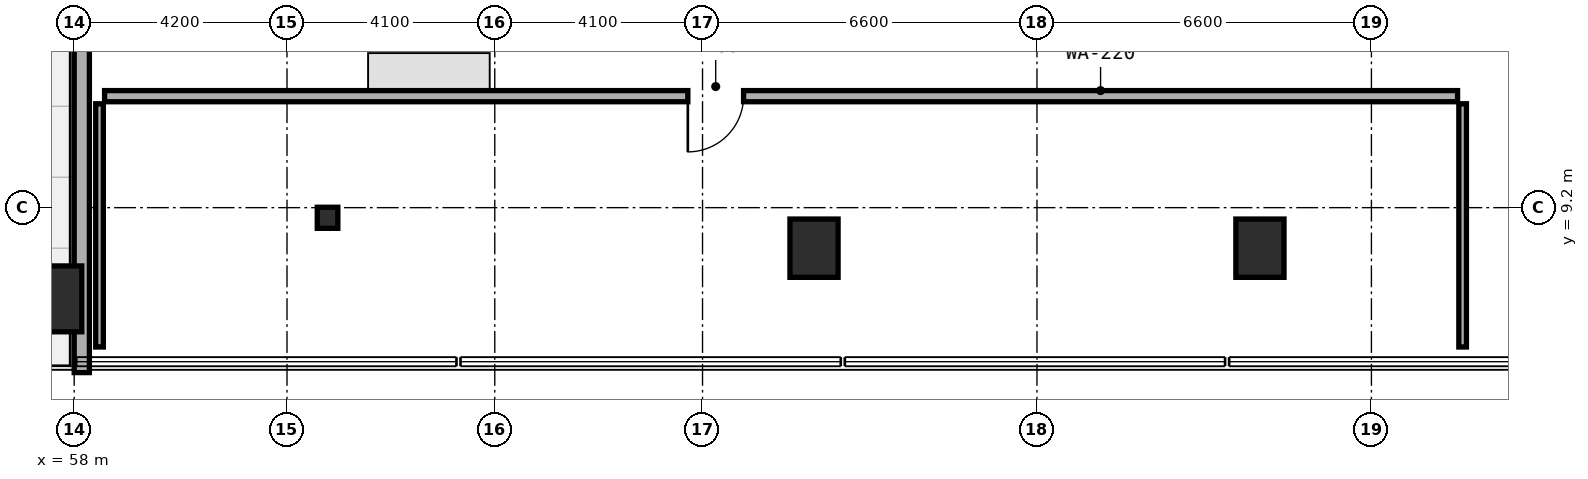
"""IFC4 building model, lengths in metres.
Left out: names, types, materials, properties, quantities, classifications, styles, units other than length and angle.
Written with IfcOpenShell. Run it as: python <this file> out.ifc"""

import sys

from ifc_helpers import new_model, si_unit, direction, frame, frame_2d, origin, origin_2d, place, context, subcontext, project, spatial, rectangle, i_section, extrude, element, fill, save


model = new_model("IFC4")
c1 = context("Model", 3, precision=1e-05, world=origin(), true_north=direction((0.0, 1.0)))
c2 = subcontext(c1, "Body", "Model", "MODEL_VIEW")
j1 = project(units=[si_unit("LENGTHUNIT", "METRE"), si_unit("PLANEANGLEUNIT", "RADIAN")], contexts=[c1])
p1 = place(None, origin())
s1 = spatial("IfcSite", under=j1, at=p1, CompositionType="ELEMENT")
p2 = place(p1, origin())
s2 = spatial("IfcBuilding", under=s1, at=p2, CompositionType="ELEMENT")
p3 = place(p2, frame((0.0, 0.0, 19.5)))
s3 = spatial("IfcBuildingStorey", under=s2, at=p3, CompositionType="ELEMENT", Elevation=19.5)
for number, where, z_axis, x_axis in (
    (1, (72.6, 8.4, 0.0), (0.0, 0.0, 1.0), (1.0, 0.0, 0.0)),
    (2, (81.4, 8.4, 0.0), (0.0, 0.0, 1.0), (1.0, 0.0, 0.0)),
):
    element("IfcColumn", number, at=place(p3, frame(where, z_axis=z_axis, x_axis=x_axis)), inside=s3, PredefinedType="COLUMN", context=c2, shape_type="SweptSolid", body=[
        extrude(rectangle(XDim=0.95, YDim=1.15, at=origin_2d()), origin(), (0.0, 0.0, 1.0), 4.5),
    ])
p4 = place(p3, frame((63.0, 9.0, 0.0), z_axis=(0.0, 0.0, 1.0), x_axis=(1.0, 0.0, 0.0)))
e3 = element("IfcColumn", 3, at=p4, inside=s3, PredefinedType="COLUMN", context=c2, shape_type="SweptSolid", body=[
    extrude(i_section(OverallWidth=0.406, OverallDepth=0.416, WebThickness=0.024, FlangeThickness=0.039, FilletRadius=0.015, at=origin_2d()), origin(), (0.0, 0.0, 1.0), 4.5),
])
p5 = place(p3, frame((57.6, 7.4, 0.0), z_axis=(0.0, 0.0, 1.0), x_axis=(1.0, 0.0, 0.0)))
e4 = element("IfcColumn", 4, at=p5, inside=s3, PredefinedType="COLUMN", context=c2, shape_type="SweptSolid", body=[
    extrude(rectangle(XDim=1.1, YDim=1.3, at=origin_2d()), origin(), (0.0, 0.0, 1.0), 4.5),
])
p6 = place(p3, frame((58.15, 17.59, 0.0), z_axis=(0.0, 0.0, 1.0), x_axis=(0.0, -1.0, 0.0)))
e5 = element("IfcWall", 5, at=p6, inside=s3, PredefinedType="STANDARD", context=c2, shape_type="SweptSolid", body=[
    extrude(rectangle(XDim=11.645, YDim=0.3, at=frame_2d((5.823, 0.0))), origin(), (0.0, 0.0, 1.0), 4.22),
])
p7 = place(p3, frame((58.5, 6.45, 0.0), z_axis=(0.0, 0.0, 1.0), x_axis=(0.0, 1.0, 0.0)))
e6 = element("IfcWall", 6, at=p7, inside=s3, PredefinedType="PARTITIONING", context=c2, shape_type="SweptSolid", body=[
    extrude(rectangle(XDim=4.8, YDim=0.15, at=frame_2d((2.4, 0.0))), origin(), (0.0, 0.0, 1.0), 4.22),
])
p8 = place(p3, frame((85.4, 6.45, 0.0), z_axis=(0.0, 0.0, 1.0), x_axis=(0.0, 1.0, 0.0)))
e7 = element("IfcWall", 7, at=p8, inside=s3, PredefinedType="PARTITIONING", context=c2, shape_type="SweptSolid", body=[
    extrude(rectangle(XDim=4.8, YDim=0.15, at=frame_2d((2.4, 0.0))), origin(), (0.0, 0.0, 1.0), 3.865),
])
p9 = place(p3, frame((58.6, 11.4, 0.0), z_axis=(0.0, 0.0, 1.0), x_axis=(1.0, 0.0, 0.0)))
e8 = element("IfcWall", 8, at=p9, inside=s3, PredefinedType="SOLIDWALL", context=c2, shape_type="SweptSolid", body=[
    extrude(rectangle(XDim=26.7, YDim=0.22, at=frame_2d((13.35, 0.0))), origin(), (0.0, 0.0, 1.0), 3.725),
])
p10 = place(p9, frame((11.51, 0.0, 0.0)))
e9 = element("IfcOpeningElement", 9, at=p10, cuts=e8, PredefinedType="OPENING", context=c2, shape_type="SweptSolid", body=[
    extrude(rectangle(XDim=1.1, YDim=2.1, at=frame_2d((0.55, 1.05))), frame((0.0, 0.12, 0.0), z_axis=(0.0, -1.0, 0.0), x_axis=(1.0, 0.0, 0.0)), (0.0, 0.0, 1.0), 0.24),
])
p11 = place(p10, frame((1.1, 0.0, 0.0), z_axis=(0.0, 0.0, 1.0), x_axis=(-1.0, 0.0, 0.0)))
e10 = element("IfcDoor", 10, at=p11, inside=s3, OperationType="SINGLE_SWING_RIGHT", PredefinedType="DOOR", context=c2, shape_type="SweptSolid", body=[
    extrude(rectangle(XDim=1.1, YDim=2.1, at=frame_2d((0.55, 1.05))), frame((0.0, 0.025, 0.0), z_axis=(0.0, -1.0, 0.0), x_axis=(1.0, 0.0, 0.0)), (0.0, 0.0, 1.0), 0.05),
])
fill(e9, e10)
save(model, sys.argv[1])
